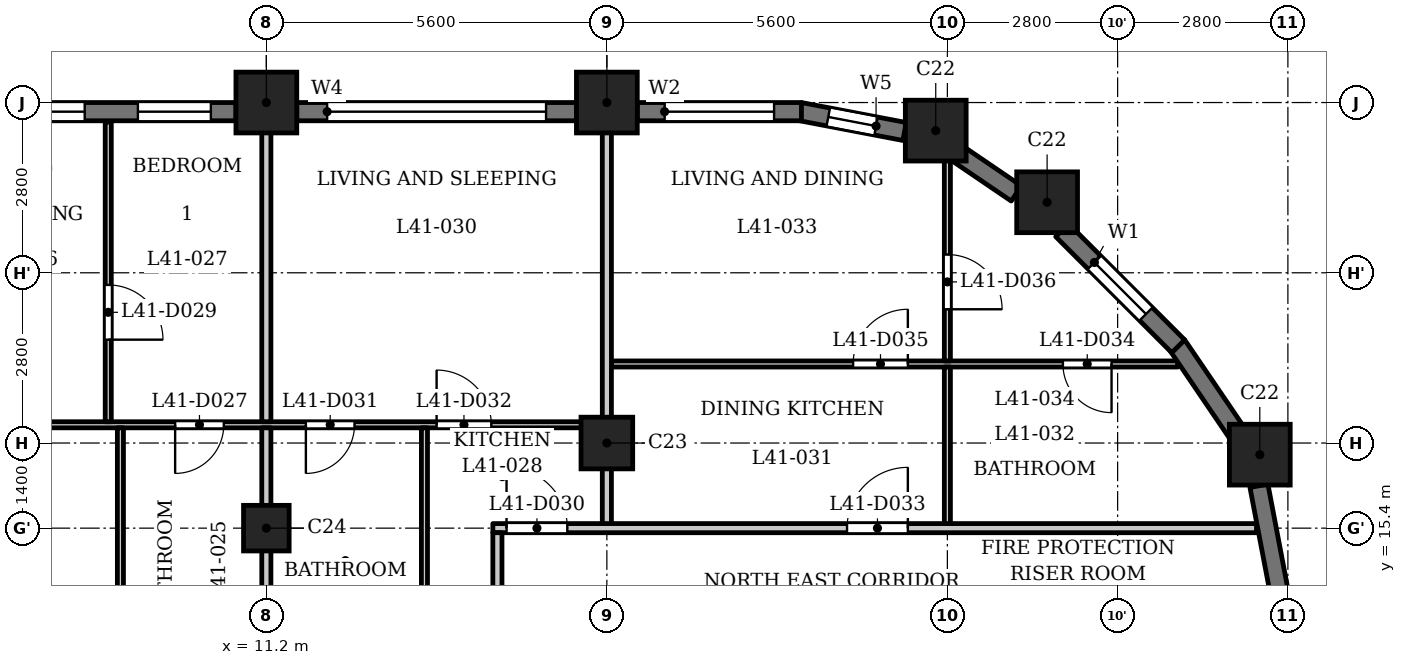
"""IFC4 building model, lengths in metres.
Left out: names, types, materials, properties, quantities, classifications, styles, units other than length and angle.
Written with IfcOpenShell. Run it as: python <this file> out.ifc"""

import sys

from ifc_helpers import new_model, si_unit, direction, frame, frame_2d, origin, origin_2d, place, context, subcontext, project, spatial, rectangle, extrude, element, fill, save


model = new_model("IFC4")
c1 = context("Model", 3, precision=1e-05, world=origin(), true_north=direction((0.0, 1.0)))
c2 = subcontext(c1, "Body", "Model", "MODEL_VIEW")
j1 = project(units=[si_unit("LENGTHUNIT", "METRE"), si_unit("PLANEANGLEUNIT", "RADIAN")], contexts=[c1])
p1 = place(None, origin())
s1 = spatial("IfcSite", under=j1, at=p1, CompositionType="ELEMENT")
p2 = place(p1, origin())
s2 = spatial("IfcBuilding", under=s1, at=p2, CompositionType="ELEMENT")
p3 = place(p2, frame((0.0, 0.0, 160.6)))
s3 = spatial("IfcBuildingStorey", under=s2, at=p3, CompositionType="ELEMENT", Elevation=160.6)
for number, where, z_axis, x_axis in (
    (1, (27.538, 16.609, 0.0), (0.0, 0.0, 1.0), (1.0, 0.0, 0.0)),
    (2, (24.04, 20.76, 0.0), (0.0, 0.0, 1.0), (1.0, 0.0, 0.0)),
    (3, (22.209, 21.938, 0.0), (0.0, 0.0, 1.0), (1.0, 0.0, 0.0)),
    (4, (16.8, 22.4, 0.0), (0.0, 0.0, 1.0), (1.0, 0.0, 0.0)),
    (5, (11.2, 22.4, 0.0), (0.0, 0.0, 1.0), (1.0, 0.0, 0.0)),
):
    element("IfcColumn", number, at=place(p3, frame(where, z_axis=z_axis, x_axis=x_axis)), inside=s3, PredefinedType="COLUMN", context=c2, shape_type="SweptSolid", body=[
        extrude(rectangle(XDim=1.0, YDim=1.0, at=origin_2d()), origin(), (0.0, 0.0, 1.0), 3.5),
    ])
p4 = place(p3, frame((16.8, 16.8, 0.0), z_axis=(0.0, 0.0, 1.0), x_axis=(1.0, 0.0, 0.0)))
e6 = element("IfcColumn", 6, at=p4, inside=s3, PredefinedType="COLUMN", context=c2, shape_type="SweptSolid", body=[
    extrude(rectangle(XDim=0.85, YDim=0.85, at=origin_2d()), origin(), (0.0, 0.0, 1.0), 3.5),
])
p5 = place(p3, frame((11.2, 15.4, 0.0), z_axis=(0.0, 0.0, 1.0), x_axis=(1.0, 0.0, 0.0)))
e7 = element("IfcColumn", 7, at=p5, inside=s3, PredefinedType="COLUMN", context=c2, shape_type="SweptSolid", body=[
    extrude(rectangle(XDim=0.75, YDim=0.75, at=origin_2d()), origin(), (0.0, 0.0, 1.0), 3.5),
])
for number, where, z_axis, x_axis in (
    (8, (27.853, 14.372, 0.0), (0.0, 0.0, 1.0), (-0.187, 0.982, 0.0)),
    (9, (27.166, 16.96, 0.0), (0.0, 0.0, 1.0), (-0.562, 0.827, 0.0)),
):
    element("IfcWall", number, at=place(p3, frame(where, z_axis=z_axis, x_axis=x_axis)), inside=s3, PredefinedType="SOLIDWALL", context=c2, shape_type="SweptSolid", body=[
        extrude(rectangle(XDim=1.756, YDim=0.3, at=frame_2d((0.878, 0.0))), origin(), (0.0, 0.0, 1.0), 2.45),
    ])
p6 = place(p3, frame((26.197, 18.391, 0.0), z_axis=(0.0, 0.0, 1.0), x_axis=(-0.707061571201, 0.707151988282, 0.0)))
e10 = element("IfcWall", 10, at=p6, inside=s3, PredefinedType="SOLIDWALL", context=c2, shape_type="SweptSolid", body=[
    extrude(rectangle(XDim=2.7, YDim=0.3, at=frame_2d((1.35, 0.0))), origin(), (0.0, 0.0, 1.0), 2.45),
])
p7 = place(p6, frame((0.75, 0.0, 0.6)))
e11 = element("IfcOpeningElement", 11, at=p7, cuts=e10, PredefinedType="OPENING", context=c2, shape_type="SweptSolid", body=[
    extrude(rectangle(XDim=1.2, YDim=1.55, at=frame_2d((0.6, 0.775))), frame((0.0, 0.16, 0.0), z_axis=(0.0, -1.0, 0.0), x_axis=(1.0, 0.0, 0.0)), (0.0, 0.0, 1.0), 0.32),
])
p8 = place(p3, frame((23.534, 20.904, 0.0), z_axis=(0.0, 0.0, 1.0), x_axis=(-0.827103906596, 0.56204904385, 0.0)))
e12 = element("IfcWall", 12, at=p8, inside=s3, PredefinedType="SOLIDWALL", context=c2, shape_type="SweptSolid", body=[
    extrude(rectangle(XDim=1.177, YDim=0.3, at=frame_2d((0.589, 0.0))), origin(), (0.0, 0.0, 1.0), 3.2),
])
p9 = place(p3, frame((21.697, 21.924, 0.0), z_axis=(0.0, 0.0, 1.0), x_axis=(-0.982284988433, 0.187393173565, 0.0)))
e13 = element("IfcWall", 13, at=p9, inside=s3, PredefinedType="SOLIDWALL", context=c2, shape_type="SweptSolid", body=[
    extrude(rectangle(XDim=1.756, YDim=0.3, at=frame_2d((0.878, 0.0))), origin(), (0.0, 0.0, 1.0), 2.45),
])
p10 = place(p9, frame((0.478, 0.0, 0.6)))
e14 = element("IfcOpeningElement", 14, at=p10, cuts=e13, PredefinedType="OPENING", context=c2, shape_type="SweptSolid", body=[
    extrude(rectangle(XDim=0.8, YDim=1.55, at=frame_2d((0.4, 0.775))), frame((0.0, 0.16, 0.0), z_axis=(0.0, -1.0, 0.0), x_axis=(1.0, 0.0, 0.0)), (0.0, 0.0, 1.0), 0.32),
])
p11 = place(p3, frame((20.0, 22.25, 0.0), z_axis=(0.0, 0.0, 1.0), x_axis=(-1.0, 0.0, 0.0)))
e15 = element("IfcWall", 15, at=p11, inside=s3, PredefinedType="SOLIDWALL", context=c2, shape_type="SweptSolid", body=[
    extrude(rectangle(XDim=2.7, YDim=0.3, at=frame_2d((1.35, 0.0))), origin(), (0.0, 0.0, 1.0), 2.45),
])
p12 = place(p11, frame((0.45, 0.0, 0.9)))
e16 = element("IfcOpeningElement", 16, at=p12, cuts=e15, PredefinedType="OPENING", context=c2, shape_type="SweptSolid", body=[
    extrude(rectangle(XDim=1.8, YDim=1.25, at=frame_2d((0.9, 0.625))), frame((0.0, 0.16, 0.0), z_axis=(0.0, -1.0, 0.0), x_axis=(1.0, 0.0, 0.0)), (0.0, 0.0, 1.0), 0.32),
])
p13 = place(p3, frame((16.3, 22.25, 0.0), z_axis=(0.0, 0.0, 1.0), x_axis=(-1.0, 0.0, 0.0)))
e17 = element("IfcWall", 17, at=p13, inside=s3, PredefinedType="SOLIDWALL", context=c2, shape_type="SweptSolid", body=[
    extrude(rectangle(XDim=4.6, YDim=0.3, at=frame_2d((2.3, 0.0))), origin(), (0.0, 0.0, 1.0), 2.45),
])
p14 = place(p13, frame((0.5, 0.0, 1.2)))
e18 = element("IfcOpeningElement", 18, at=p14, cuts=e17, PredefinedType="OPENING", context=c2, shape_type="SweptSolid", body=[
    extrude(rectangle(XDim=3.6, YDim=0.95, at=frame_2d((1.8, 0.475))), frame((0.0, 0.16, 0.0), z_axis=(0.0, -1.0, 0.0), x_axis=(1.0, 0.0, 0.0)), (0.0, 0.0, 1.0), 0.32),
])
p15 = place(p3, frame((10.7, 22.25, 0.0), z_axis=(0.0, 0.0, 1.0), x_axis=(-1.0, 0.0, 0.0)))
e19 = element("IfcWall", 19, at=p15, inside=s3, PredefinedType="SOLIDWALL", context=c2, shape_type="SweptSolid", body=[
    extrude(rectangle(XDim=4.6, YDim=0.3, at=frame_2d((2.3, 0.0))), origin(), (0.0, 0.0, 1.0), 2.45),
])
p16 = place(p15, frame((0.413, 0.0, 0.6)))
e20 = element("IfcOpeningElement", 20, at=p16, cuts=e19, PredefinedType="OPENING", context=c2, shape_type="SweptSolid", body=[
    extrude(rectangle(XDim=1.2, YDim=1.55, at=frame_2d((0.6, 0.775))), frame((0.0, 0.16, 0.0), z_axis=(0.0, -1.0, 0.0), x_axis=(1.0, 0.0, 0.0)), (0.0, 0.0, 1.0), 0.32),
])
p17 = place(p15, frame((2.488, 0.0, 0.9)))
e21 = element("IfcOpeningElement", 21, at=p17, cuts=e19, PredefinedType="OPENING", context=c2, shape_type="SweptSolid", body=[
    extrude(rectangle(XDim=1.8, YDim=1.25, at=frame_2d((0.9, 0.625))), frame((0.0, 0.16, 0.0), z_axis=(0.0, -1.0, 0.0), x_axis=(1.0, 0.0, 0.0)), (0.0, 0.0, 1.0), 0.32),
])
p18 = place(p3, frame((14.925, 15.4, 0.0), z_axis=(0.0, 0.0, 1.0), x_axis=(1.0, 0.0, 0.0)))
e22 = element("IfcWall", 22, at=p18, inside=s3, PredefinedType="PARTITIONING", context=c2, shape_type="SweptSolid", body=[
    extrude(rectangle(XDim=12.559, YDim=0.15, at=frame_2d((6.279, 0.0))), origin(), (0.0, 0.0, 1.0), 3.2),
])
p19 = place(p18, frame((0.225, 0.0, 0.0)))
e23 = element("IfcOpeningElement", 23, at=p19, cuts=e22, PredefinedType="OPENING", context=c2, shape_type="SweptSolid", body=[
    extrude(rectangle(XDim=1.0, YDim=2.1, at=frame_2d((0.5, 1.05))), frame((0.0, 0.085, 0.0), z_axis=(0.0, -1.0, 0.0), x_axis=(1.0, 0.0, 0.0)), (0.0, 0.0, 1.0), 0.17),
])
p20 = place(p18, frame((5.825, 0.0, 0.0)))
e24 = element("IfcOpeningElement", 24, at=p20, cuts=e22, PredefinedType="OPENING", context=c2, shape_type="SweptSolid", body=[
    extrude(rectangle(XDim=1.0, YDim=2.1, at=frame_2d((0.5, 1.05))), frame((0.0, 0.085, 0.0), z_axis=(0.0, -1.0, 0.0), x_axis=(1.0, 0.0, 0.0)), (0.0, 0.0, 1.0), 0.17),
])
p21 = place(p3, frame((-16.725, 17.1, 0.0), z_axis=(0.0, 0.0, 1.0), x_axis=(1.0, 0.0, 0.0)))
e25 = element("IfcWall", 25, at=p21, inside=s3, PredefinedType="PARTITIONING", context=c2, shape_type="SweptSolid", body=[
    extrude(rectangle(XDim=33.45, YDim=0.1, at=frame_2d((16.725, 0.0))), origin(), (0.0, 0.0, 1.0), 3.2),
])
p22 = place(p21, frame((11.925, 0.0, 0.0)))
e26 = element("IfcOpeningElement", 26, at=p22, cuts=e25, PredefinedType="OPENING", context=c2, shape_type="SweptSolid", body=[
    extrude(rectangle(XDim=0.9, YDim=2.1, at=frame_2d((0.45, 1.05))), frame((0.0, 0.06, 0.0), z_axis=(0.0, -1.0, 0.0), x_axis=(1.0, 0.0, 0.0)), (0.0, 0.0, 1.0), 0.12),
])
p23 = place(p21, frame((15.175, 0.0, 0.0)))
e27 = element("IfcOpeningElement", 27, at=p23, cuts=e25, PredefinedType="OPENING", context=c2, shape_type="SweptSolid", body=[
    extrude(rectangle(XDim=0.9, YDim=2.1, at=frame_2d((0.45, 1.05))), frame((0.0, 0.06, 0.0), z_axis=(0.0, -1.0, 0.0), x_axis=(1.0, 0.0, 0.0)), (0.0, 0.0, 1.0), 0.12),
])
p24 = place(p21, frame((6.575, 0.0, 0.0)))
e28 = element("IfcOpeningElement", 28, at=p24, cuts=e25, PredefinedType="OPENING", context=c2, shape_type="SweptSolid", body=[
    extrude(rectangle(XDim=0.9, YDim=2.1, at=frame_2d((0.45, 1.05))), frame((0.0, 0.06, 0.0), z_axis=(0.0, -1.0, 0.0), x_axis=(1.0, 0.0, 0.0)), (0.0, 0.0, 1.0), 0.12),
])
p25 = place(p21, frame((17.375, 0.0, 0.0)))
e29 = element("IfcOpeningElement", 29, at=p25, cuts=e25, PredefinedType="OPENING", context=c2, shape_type="SweptSolid", body=[
    extrude(rectangle(XDim=0.8, YDim=2.1, at=frame_2d((0.4, 1.05))), frame((0.0, 0.06, 0.0), z_axis=(0.0, -1.0, 0.0), x_axis=(1.0, 0.0, 0.0)), (0.0, 0.0, 1.0), 0.12),
])
p26 = place(p21, frame((20.025, 0.0, 0.0)))
e30 = element("IfcOpeningElement", 30, at=p26, cuts=e25, PredefinedType="OPENING", context=c2, shape_type="SweptSolid", body=[
    extrude(rectangle(XDim=0.9, YDim=2.1, at=frame_2d((0.45, 1.05))), frame((0.0, 0.06, 0.0), z_axis=(0.0, -1.0, 0.0), x_axis=(1.0, 0.0, 0.0)), (0.0, 0.0, 1.0), 0.12),
])
p27 = place(p21, frame((26.425, 0.0, 0.0)))
e31 = element("IfcOpeningElement", 31, at=p27, cuts=e25, PredefinedType="OPENING", context=c2, shape_type="SweptSolid", body=[
    extrude(rectangle(XDim=0.8, YDim=2.1, at=frame_2d((0.4, 1.05))), frame((0.0, 0.06, 0.0), z_axis=(0.0, -1.0, 0.0), x_axis=(1.0, 0.0, 0.0)), (0.0, 0.0, 1.0), 0.12),
])
p28 = place(p21, frame((23.025, 0.0, 0.0)))
e32 = element("IfcOpeningElement", 32, at=p28, cuts=e25, PredefinedType="OPENING", context=c2, shape_type="SweptSolid", body=[
    extrude(rectangle(XDim=0.9, YDim=2.1, at=frame_2d((0.45, 1.05))), frame((0.0, 0.06, 0.0), z_axis=(0.0, -1.0, 0.0), x_axis=(1.0, 0.0, 0.0)), (0.0, 0.0, 1.0), 0.12),
])
p29 = place(p21, frame((28.575, 0.0, 0.0)))
e33 = element("IfcOpeningElement", 33, at=p29, cuts=e25, PredefinedType="OPENING", context=c2, shape_type="SweptSolid", body=[
    extrude(rectangle(XDim=0.8, YDim=2.1, at=frame_2d((0.4, 1.05))), frame((0.0, 0.06, 0.0), z_axis=(0.0, -1.0, 0.0), x_axis=(1.0, 0.0, 0.0)), (0.0, 0.0, 1.0), 0.12),
])
p30 = place(p21, frame((30.725, 0.0, 0.0)))
e34 = element("IfcOpeningElement", 34, at=p30, cuts=e25, PredefinedType="OPENING", context=c2, shape_type="SweptSolid", body=[
    extrude(rectangle(XDim=0.9, YDim=2.1, at=frame_2d((0.45, 1.05))), frame((0.0, 0.06, 0.0), z_axis=(0.0, -1.0, 0.0), x_axis=(1.0, 0.0, 0.0)), (0.0, 0.0, 1.0), 0.12),
])
p31 = place(p3, frame((16.875, 18.1, 0.0), z_axis=(0.0, 0.0, 1.0), x_axis=(1.0, 0.0, 0.0)))
e35 = element("IfcWall", 35, at=p31, inside=s3, PredefinedType="PARTITIONING", context=c2, shape_type="SweptSolid", body=[
    extrude(rectangle(XDim=9.315, YDim=0.1, at=frame_2d((4.658, 0.0))), origin(), (0.0, 0.0, 1.0), 3.2),
])
p32 = place(p31, frame((7.425, 0.0, 0.0)))
e36 = element("IfcOpeningElement", 36, at=p32, cuts=e35, PredefinedType="OPENING", context=c2, shape_type="SweptSolid", body=[
    extrude(rectangle(XDim=0.8, YDim=2.1, at=frame_2d((0.4, 1.05))), frame((0.0, 0.06, 0.0), z_axis=(0.0, -1.0, 0.0), x_axis=(1.0, 0.0, 0.0)), (0.0, 0.0, 1.0), 0.12),
])
p33 = place(p31, frame((3.975, 0.0, 0.0)))
e37 = element("IfcOpeningElement", 37, at=p33, cuts=e35, PredefinedType="OPENING", context=c2, shape_type="SweptSolid", body=[
    extrude(rectangle(XDim=0.9, YDim=2.1, at=frame_2d((0.45, 1.05))), frame((0.0, 0.06, 0.0), z_axis=(0.0, -1.0, 0.0), x_axis=(1.0, 0.0, 0.0)), (0.0, 0.0, 1.0), 0.12),
])
p34 = place(p3, frame((8.6, 17.15, 0.0), z_axis=(0.0, 0.0, 1.0), x_axis=(0.0, 1.0, 0.0)))
e38 = element("IfcWall", 38, at=p34, inside=s3, PredefinedType="PARTITIONING", context=c2, shape_type="SweptSolid", body=[
    extrude(rectangle(XDim=4.93, YDim=0.1, at=frame_2d((2.465, 0.0))), origin(), (0.0, 0.0, 1.0), 3.2),
])
p35 = place(p34, frame((1.35, 0.0, 0.0)))
e39 = element("IfcOpeningElement", 39, at=p35, cuts=e38, PredefinedType="OPENING", context=c2, shape_type="SweptSolid", body=[
    extrude(rectangle(XDim=0.9, YDim=2.1, at=frame_2d((0.45, 1.05))), frame((0.0, 0.06, 0.0), z_axis=(0.0, -1.0, 0.0), x_axis=(1.0, 0.0, 0.0)), (0.0, 0.0, 1.0), 0.12),
])
p36 = place(p3, frame((8.8, 13.275, 0.0), z_axis=(0.0, 0.0, 1.0), x_axis=(0.0, 1.0, 0.0)))
e40 = element("IfcWall", 40, at=p36, inside=s3, PredefinedType="PARTITIONING", context=c2, shape_type="SweptSolid", body=[
    extrude(rectangle(XDim=3.775, YDim=0.1, at=frame_2d((1.888, 0.0))), origin(), (0.0, 0.0, 1.0), 3.2),
])
p37 = place(p3, frame((11.2, 13.275, 0.0), z_axis=(0.0, 0.0, 1.0), x_axis=(0.0, 1.0, 0.0)))
e41 = element("IfcWall", 41, at=p37, inside=s3, PredefinedType="PARTITIONING", context=c2, shape_type="SweptSolid", body=[
    extrude(rectangle(XDim=3.775, YDim=0.15, at=frame_2d((1.888, 0.0))), origin(), (0.0, 0.0, 1.0), 3.2),
])
p38 = place(p3, frame((11.2, 17.15, 0.0), z_axis=(0.0, 0.0, 1.0), x_axis=(0.0, 1.0, 0.0)))
e42 = element("IfcWall", 42, at=p38, inside=s3, PredefinedType="PARTITIONING", context=c2, shape_type="SweptSolid", body=[
    extrude(rectangle(XDim=5.73, YDim=0.15, at=frame_2d((2.865, 0.0))), origin(), (0.0, 0.0, 1.0), 3.2),
])
p39 = place(p3, frame((13.8, 13.275, 0.0), z_axis=(0.0, 0.0, 1.0), x_axis=(0.0, 1.0, 0.0)))
e43 = element("IfcWall", 43, at=p39, inside=s3, PredefinedType="PARTITIONING", context=c2, shape_type="SweptSolid", body=[
    extrude(rectangle(XDim=3.775, YDim=0.1, at=frame_2d((1.888, 0.0))), origin(), (0.0, 0.0, 1.0), 3.2),
])
p40 = place(p3, frame((15.0, 13.275, 0.0), z_axis=(0.0, 0.0, 1.0), x_axis=(0.0, 1.0, 0.0)))
e44 = element("IfcWall", 44, at=p40, inside=s3, PredefinedType="PARTITIONING", context=c2, shape_type="SweptSolid", body=[
    extrude(rectangle(XDim=2.05, YDim=0.15, at=frame_2d((1.025, 0.0))), origin(), (0.0, 0.0, 1.0), 3.2),
])
p41 = place(p3, frame((16.8, 15.475, 0.0), z_axis=(0.0, 0.0, 1.0), x_axis=(0.0, 1.0, 0.0)))
e45 = element("IfcWall", 45, at=p41, inside=s3, PredefinedType="PARTITIONING", context=c2, shape_type="SweptSolid", body=[
    extrude(rectangle(XDim=7.405, YDim=0.15, at=frame_2d((3.702, 0.0))), origin(), (0.0, 0.0, 1.0), 3.2),
])
p42 = place(p3, frame((22.4, 15.475, 0.0), z_axis=(0.0, 0.0, 1.0), x_axis=(0.0, 1.0, 0.0)))
e46 = element("IfcWall", 46, at=p42, inside=s3, PredefinedType="PARTITIONING", context=c2, shape_type="SweptSolid", body=[
    extrude(rectangle(XDim=2.575, YDim=0.1, at=frame_2d((1.288, 0.0))), origin(), (0.0, 0.0, 1.0), 3.2),
])
p43 = place(p3, frame((22.4, 18.15, 0.0), z_axis=(0.0, 0.0, 1.0), x_axis=(0.0, 1.0, 0.0)))
e47 = element("IfcWall", 47, at=p43, inside=s3, PredefinedType="PARTITIONING", context=c2, shape_type="SweptSolid", body=[
    extrude(rectangle(XDim=3.57, YDim=0.1, at=frame_2d((1.785, 0.0))), origin(), (0.0, 0.0, 1.0), 3.2),
])
p44 = place(p43, frame((0.85, 0.0, 0.0)))
e48 = element("IfcOpeningElement", 48, at=p44, cuts=e47, PredefinedType="OPENING", context=c2, shape_type="SweptSolid", body=[
    extrude(rectangle(XDim=0.9, YDim=2.1, at=frame_2d((0.45, 1.05))), frame((0.0, 0.06, 0.0), z_axis=(0.0, -1.0, 0.0), x_axis=(1.0, 0.0, 0.0)), (0.0, 0.0, 1.0), 0.12),
])
p45 = place(p27, origin())
e49 = element("IfcDoor", 49, at=p45, inside=s3, OperationType="SINGLE_SWING_LEFT", PredefinedType="DOOR", context=c2, shape_type="SweptSolid", body=[
    extrude(rectangle(XDim=0.8, YDim=2.1, at=frame_2d((0.4, 1.05))), frame((0.0, 0.025, 0.0), z_axis=(0.0, -1.0, 0.0), x_axis=(1.0, 0.0, 0.0)), (0.0, 0.0, 1.0), 0.05),
])
fill(e31, e49)
p46 = place(p35, origin())
e50 = element("IfcDoor", 50, at=p46, inside=s3, OperationType="SINGLE_SWING_LEFT", PredefinedType="DOOR", context=c2, shape_type="SweptSolid", body=[
    extrude(rectangle(XDim=0.9, YDim=2.1, at=frame_2d((0.45, 1.05))), frame((0.0, 0.025, 0.0), z_axis=(0.0, -1.0, 0.0), x_axis=(1.0, 0.0, 0.0)), (0.0, 0.0, 1.0), 0.05),
])
fill(e39, e50)
p47 = place(p19, origin())
e51 = element("IfcDoor", 51, at=p47, inside=s3, OperationType="SINGLE_SWING_RIGHT", PredefinedType="DOOR", context=c2, shape_type="SweptSolid", body=[
    extrude(rectangle(XDim=1.0, YDim=2.1, at=frame_2d((0.5, 1.05))), frame((0.0, 0.025, 0.0), z_axis=(0.0, -1.0, 0.0), x_axis=(1.0, 0.0, 0.0)), (0.0, 0.0, 1.0), 0.05),
])
fill(e23, e51)
p48 = place(p29, origin())
e52 = element("IfcDoor", 52, at=p48, inside=s3, OperationType="SINGLE_SWING_LEFT", PredefinedType="DOOR", context=c2, shape_type="SweptSolid", body=[
    extrude(rectangle(XDim=0.8, YDim=2.1, at=frame_2d((0.4, 1.05))), frame((0.0, 0.025, 0.0), z_axis=(0.0, -1.0, 0.0), x_axis=(1.0, 0.0, 0.0)), (0.0, 0.0, 1.0), 0.05),
])
fill(e33, e52)
p49 = place(p30, origin())
e53 = element("IfcDoor", 53, at=p49, inside=s3, OperationType="SINGLE_SWING_RIGHT", PredefinedType="DOOR", context=c2, shape_type="SweptSolid", body=[
    extrude(rectangle(XDim=0.9, YDim=2.1, at=frame_2d((0.45, 1.05))), frame((0.0, 0.025, 0.0), z_axis=(0.0, -1.0, 0.0), x_axis=(1.0, 0.0, 0.0)), (0.0, 0.0, 1.0), 0.05),
])
fill(e34, e53)
p50 = place(p20, origin())
e54 = element("IfcDoor", 54, at=p50, inside=s3, OperationType="SINGLE_SWING_LEFT", PredefinedType="DOOR", context=c2, shape_type="SweptSolid", body=[
    extrude(rectangle(XDim=1.0, YDim=2.1, at=frame_2d((0.5, 1.05))), frame((0.0, 0.025, 0.0), z_axis=(0.0, -1.0, 0.0), x_axis=(1.0, 0.0, 0.0)), (0.0, 0.0, 1.0), 0.05),
])
fill(e24, e54)
p51 = place(p32, origin())
e55 = element("IfcDoor", 55, at=p51, inside=s3, OperationType="SINGLE_SWING_RIGHT", PredefinedType="DOOR", context=c2, shape_type="SweptSolid", body=[
    extrude(rectangle(XDim=0.8, YDim=2.1, at=frame_2d((0.4, 1.05))), frame((0.0, 0.025, 0.0), z_axis=(0.0, -1.0, 0.0), x_axis=(1.0, 0.0, 0.0)), (0.0, 0.0, 1.0), 0.05),
])
fill(e36, e55)
p52 = place(p33, origin())
e56 = element("IfcDoor", 56, at=p52, inside=s3, OperationType="SINGLE_SWING_LEFT", PredefinedType="DOOR", context=c2, shape_type="SweptSolid", body=[
    extrude(rectangle(XDim=0.9, YDim=2.1, at=frame_2d((0.45, 1.05))), frame((0.0, 0.025, 0.0), z_axis=(0.0, -1.0, 0.0), x_axis=(1.0, 0.0, 0.0)), (0.0, 0.0, 1.0), 0.05),
])
fill(e37, e56)
p53 = place(p44, origin())
e57 = element("IfcDoor", 57, at=p53, inside=s3, OperationType="SINGLE_SWING_LEFT", PredefinedType="DOOR", context=c2, shape_type="SweptSolid", body=[
    extrude(rectangle(XDim=0.9, YDim=2.1, at=frame_2d((0.45, 1.05))), frame((0.0, 0.025, 0.0), z_axis=(0.0, -1.0, 0.0), x_axis=(1.0, 0.0, 0.0)), (0.0, 0.0, 1.0), 0.05),
])
fill(e48, e57)
p54 = place(p7, origin())
e58 = element("IfcWindow", 58, at=p54, inside=s3, PartitioningType="SINGLE_PANEL", PredefinedType="WINDOW", context=c2, shape_type="SweptSolid", body=[
    extrude(rectangle(XDim=1.2, YDim=1.55, at=frame_2d((0.6, 0.775))), frame((0.0, 0.03, 0.0), z_axis=(0.0, -1.0, 0.0), x_axis=(1.0, 0.0, 0.0)), (0.0, 0.0, 1.0), 0.06),
])
fill(e11, e58)
p55 = place(p10, origin())
e59 = element("IfcWindow", 59, at=p55, inside=s3, PartitioningType="SINGLE_PANEL", PredefinedType="WINDOW", context=c2, shape_type="SweptSolid", body=[
    extrude(rectangle(XDim=0.8, YDim=1.55, at=frame_2d((0.4, 0.775))), frame((0.0, 0.03, 0.0), z_axis=(0.0, -1.0, 0.0), x_axis=(1.0, 0.0, 0.0)), (0.0, 0.0, 1.0), 0.06),
])
fill(e14, e59)
p56 = place(p12, origin())
e60 = element("IfcWindow", 60, at=p56, inside=s3, PartitioningType="SINGLE_PANEL", PredefinedType="WINDOW", context=c2, shape_type="SweptSolid", body=[
    extrude(rectangle(XDim=1.8, YDim=1.25, at=frame_2d((0.9, 0.625))), frame((0.0, 0.03, 0.0), z_axis=(0.0, -1.0, 0.0), x_axis=(1.0, 0.0, 0.0)), (0.0, 0.0, 1.0), 0.06),
])
fill(e16, e60)
p57 = place(p14, origin())
e61 = element("IfcWindow", 61, at=p57, inside=s3, PartitioningType="SINGLE_PANEL", PredefinedType="WINDOW", context=c2, shape_type="SweptSolid", body=[
    extrude(rectangle(XDim=3.6, YDim=0.95, at=frame_2d((1.8, 0.475))), frame((0.0, 0.03, 0.0), z_axis=(0.0, -1.0, 0.0), x_axis=(1.0, 0.0, 0.0)), (0.0, 0.0, 1.0), 0.06),
])
fill(e18, e61)
p58 = place(p16, origin())
e62 = element("IfcWindow", 62, at=p58, inside=s3, PartitioningType="SINGLE_PANEL", PredefinedType="WINDOW", context=c2, shape_type="SweptSolid", body=[
    extrude(rectangle(XDim=1.2, YDim=1.55, at=frame_2d((0.6, 0.775))), frame((0.0, 0.03, 0.0), z_axis=(0.0, -1.0, 0.0), x_axis=(1.0, 0.0, 0.0)), (0.0, 0.0, 1.0), 0.06),
])
fill(e20, e62)
p59 = place(p17, origin())
e63 = element("IfcWindow", 63, at=p59, inside=s3, PartitioningType="SINGLE_PANEL", PredefinedType="WINDOW", context=c2, shape_type="SweptSolid", body=[
    extrude(rectangle(XDim=1.8, YDim=1.25, at=frame_2d((0.9, 0.625))), frame((0.0, 0.03, 0.0), z_axis=(0.0, -1.0, 0.0), x_axis=(1.0, 0.0, 0.0)), (0.0, 0.0, 1.0), 0.06),
])
fill(e21, e63)
save(model, sys.argv[1])
